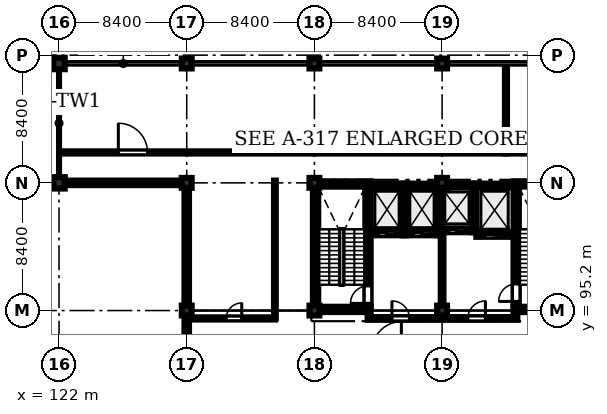
"""IFC4 building model, lengths in metres.
Left out: names, types, materials, properties, quantities, classifications, styles, units other than length and angle.
Written with IfcOpenShell. Run it as: python <this file> out.ifc"""

import sys

from ifc_helpers import new_model, si_unit, direction, frame, frame_2d, origin, origin_2d, place, context, subcontext, project, spatial, rectangle, extrude, element, fill, save


model = new_model("IFC4")
c1 = context("Model", 3, precision=1e-05, world=origin(), true_north=direction((0.0, 1.0)))
c2 = subcontext(c1, "Body", "Model", "MODEL_VIEW")
j1 = project(units=[si_unit("LENGTHUNIT", "METRE"), si_unit("PLANEANGLEUNIT", "RADIAN")], contexts=[c1])
p1 = place(None, origin())
s1 = spatial("IfcSite", under=j1, at=p1, CompositionType="ELEMENT")
p2 = place(p1, origin())
s2 = spatial("IfcBuilding", under=s1, at=p2, CompositionType="ELEMENT")
p3 = place(p2, frame((0.0, 0.0, 61.2)))
s3 = spatial("IfcBuildingStorey", under=s2, at=p3, CompositionType="ELEMENT", Elevation=61.2)
for number, where, z_axis, x_axis in (
    (1, (122.0, 103.6, 0.0), (0.0, 0.0, 1.0), (1.0, 0.0, 0.0)),
    (2, (122.0, 111.45, 0.0), (0.0, 0.0, 1.0), (1.0, 0.0, 0.0)),
):
    element("IfcColumn", number, at=place(p3, frame(where, z_axis=z_axis, x_axis=x_axis)), inside=s3, PredefinedType="COLUMN", context=c2, shape_type="SweptSolid", body=[
        extrude(rectangle(XDim=0.75, YDim=0.75, at=origin_2d()), origin(), (0.0, 0.0, 1.0), 4.28),
    ])
for number, where, z_axis, x_axis in (
    (3, (130.4, 95.2, 0.0), (0.0, 0.0, 1.0), (1.0, 0.0, 0.0)),
    (4, (130.4, 103.6, 0.0), (0.0, 0.0, 1.0), (1.0, 0.0, 0.0)),
    (5, (130.4, 111.45, 0.0), (0.0, 0.0, 1.0), (1.0, 0.0, 0.0)),
    (6, (138.8, 95.2, 0.0), (0.0, 0.0, 1.0), (1.0, 0.0, 0.0)),
    (7, (138.8, 103.6, 0.0), (0.0, 0.0, 1.0), (1.0, 0.0, 0.0)),
    (8, (138.8, 111.45, 0.0), (0.0, 0.0, 1.0), (1.0, 0.0, 0.0)),
    (9, (147.2, 95.2, 0.0), (0.0, 0.0, 1.0), (1.0, 0.0, 0.0)),
    (10, (147.2, 103.6, 0.0), (0.0, 0.0, 1.0), (1.0, 0.0, 0.0)),
    (11, (147.2, 111.45, 0.0), (0.0, 0.0, 1.0), (1.0, 0.0, 0.0)),
):
    element("IfcColumn", number, at=place(p3, frame(where, z_axis=z_axis, x_axis=x_axis)), inside=s3, PredefinedType="COLUMN", context=c2, shape_type="SweptSolid", body=[
        extrude(rectangle(XDim=0.65, YDim=0.65, at=origin_2d()), origin(), (0.0, 0.0, 1.0), 4.28),
    ])
for number, where, z_axis, x_axis in (
    (12, (138.7, 95.275, 0.0), (0.0, 0.0, 1.0), (1.0, 0.0, 0.0)),
    (13, (138.7, 103.525, 0.0), (0.0, 0.0, 1.0), (1.0, 0.0, 0.0)),
):
    element("IfcWall", number, at=place(p3, frame(where, z_axis=z_axis, x_axis=x_axis)), inside=s3, PredefinedType="SHEAR", context=c2, shape_type="SweptSolid", body=[
        extrude(rectangle(XDim=3.8, YDim=0.35, at=frame_2d((1.9, 0.0))), origin(), (0.0, 0.0, 1.0), 4.28),
    ])
p4 = place(p3, frame((138.875, 95.45, 0.0), z_axis=(0.0, 0.0, 1.0), x_axis=(0.0, 1.0, 0.0)))
e14 = element("IfcWall", 14, at=p4, inside=s3, PredefinedType="SHEAR", context=c2, shape_type="SweptSolid", body=[
    extrude(rectangle(XDim=7.9, YDim=0.35, at=frame_2d((3.95, 0.0))), origin(), (0.0, 0.0, 1.0), 4.28),
])
p5 = place(p3, frame((142.325, 95.45, 0.0), z_axis=(0.0, 0.0, 1.0), x_axis=(0.0, 1.0, 0.0)))
e15 = element("IfcWall", 15, at=p5, inside=s3, PredefinedType="SHEAR", context=c2, shape_type="SweptSolid", body=[
    extrude(rectangle(XDim=7.9, YDim=0.35, at=frame_2d((3.95, 0.0))), origin(), (0.0, 0.0, 1.0), 4.28),
])
p6 = place(p5, frame((0.22, 0.0, 0.0)))
e16 = element("IfcOpeningElement", 16, at=p6, cuts=e15, PredefinedType="OPENING", context=c2, shape_type="SweptSolid", body=[
    extrude(rectangle(XDim=1.15, YDim=2.15, at=frame_2d((0.575, 1.075))), frame((0.0, 0.185, 0.0), z_axis=(0.0, -1.0, 0.0), x_axis=(1.0, 0.0, 0.0)), (0.0, 0.0, 1.0), 0.37),
])
for number, where, z_axis, x_axis in (
    (17, (151.9, 95.275, 0.0), (0.0, 0.0, 1.0), (1.0, 0.0, 0.0)),
    (18, (151.9, 103.525, 0.0), (0.0, 0.0, 1.0), (1.0, 0.0, 0.0)),
):
    element("IfcWall", number, at=place(p3, frame(where, z_axis=z_axis, x_axis=x_axis)), inside=s3, PredefinedType="SHEAR", context=c2, shape_type="SweptSolid", body=[
        extrude(rectangle(XDim=3.8, YDim=0.35, at=frame_2d((1.9, 0.0))), origin(), (0.0, 0.0, 1.0), 4.28),
    ])
p7 = place(p3, frame((152.075, 95.45, 0.0), z_axis=(0.0, 0.0, 1.0), x_axis=(0.0, 1.0, 0.0)))
e19 = element("IfcWall", 19, at=p7, inside=s3, PredefinedType="SHEAR", context=c2, shape_type="SweptSolid", body=[
    extrude(rectangle(XDim=7.9, YDim=0.35, at=frame_2d((3.95, 0.0))), origin(), (0.0, 0.0, 1.0), 4.28),
])
p8 = place(p7, frame((0.35, 0.0, 0.0)))
e20 = element("IfcOpeningElement", 20, at=p8, cuts=e19, PredefinedType="OPENING", context=c2, shape_type="SweptSolid", body=[
    extrude(rectangle(XDim=1.15, YDim=2.15, at=frame_2d((0.575, 1.075))), frame((0.0, 0.185, 0.0), z_axis=(0.0, -1.0, 0.0), x_axis=(1.0, 0.0, 0.0)), (0.0, 0.0, 1.0), 0.37),
])
p9 = place(p3, frame((142.5, 100.275, 0.0), z_axis=(0.0, 0.0, 1.0), x_axis=(1.0, 0.0, 0.0)))
e21 = element("IfcWall", 21, at=p9, inside=s3, PredefinedType="SHEAR", context=c2, shape_type="SweptSolid", body=[
    extrude(rectangle(XDim=2.1, YDim=0.25, at=frame_2d((1.05, 0.0))), origin(), (0.0, 0.0, 1.0), 4.28),
])
p10 = place(p9, frame((0.5, 0.0, 0.0)))
e22 = element("IfcOpeningElement", 22, at=p10, cuts=e21, PredefinedType="OPENING", context=c2, shape_type="SweptSolid", body=[
    extrude(rectangle(XDim=1.1, YDim=2.15, at=frame_2d((0.55, 1.075))), frame((0.0, 0.135, 0.0), z_axis=(0.0, -1.0, 0.0), x_axis=(1.0, 0.0, 0.0)), (0.0, 0.0, 1.0), 0.27),
])
p11 = place(p3, frame((142.5, 103.425, 0.0), z_axis=(0.0, 0.0, 1.0), x_axis=(1.0, 0.0, 0.0)))
e23 = element("IfcWall", 23, at=p11, inside=s3, PredefinedType="SHEAR", context=c2, shape_type="SweptSolid", body=[
    extrude(rectangle(XDim=2.1, YDim=0.25, at=frame_2d((1.05, 0.0))), origin(), (0.0, 0.0, 1.0), 4.28),
])
p12 = place(p3, frame((144.725, 100.15, 0.0), z_axis=(0.0, 0.0, 1.0), x_axis=(0.0, 1.0, 0.0)))
e24 = element("IfcWall", 24, at=p12, inside=s3, PredefinedType="SHEAR", context=c2, shape_type="SweptSolid", body=[
    extrude(rectangle(XDim=3.4, YDim=0.25, at=frame_2d((1.7, 0.0))), origin(), (0.0, 0.0, 1.0), 4.28),
])
p13 = place(p3, frame((144.85, 100.275, 0.0), z_axis=(0.0, 0.0, 1.0), x_axis=(1.0, 0.0, 0.0)))
e25 = element("IfcWall", 25, at=p13, inside=s3, PredefinedType="SHEAR", context=c2, shape_type="SweptSolid", body=[
    extrude(rectangle(XDim=2.05, YDim=0.25, at=frame_2d((1.025, 0.0))), origin(), (0.0, 0.0, 1.0), 4.28),
])
p14 = place(p13, frame((0.465, 0.0, 0.0)))
e26 = element("IfcOpeningElement", 26, at=p14, cuts=e25, PredefinedType="OPENING", context=c2, shape_type="SweptSolid", body=[
    extrude(rectangle(XDim=1.12, YDim=2.15, at=frame_2d((0.56, 1.075))), frame((0.0, 0.135, 0.0), z_axis=(0.0, -1.0, 0.0), x_axis=(1.0, 0.0, 0.0)), (0.0, 0.0, 1.0), 0.27),
])
p15 = place(p3, frame((144.85, 103.425, 0.0), z_axis=(0.0, 0.0, 1.0), x_axis=(1.0, 0.0, 0.0)))
e27 = element("IfcWall", 27, at=p15, inside=s3, PredefinedType="SHEAR", context=c2, shape_type="SweptSolid", body=[
    extrude(rectangle(XDim=2.05, YDim=0.25, at=frame_2d((1.025, 0.0))), origin(), (0.0, 0.0, 1.0), 4.28),
])
p16 = place(p3, frame((147.025, 100.15, 0.0), z_axis=(0.0, 0.0, 1.0), x_axis=(0.0, 1.0, 0.0)))
e28 = element("IfcWall", 28, at=p16, inside=s3, PredefinedType="SHEAR", context=c2, shape_type="SweptSolid", body=[
    extrude(rectangle(XDim=3.4, YDim=0.25, at=frame_2d((1.7, 0.0))), origin(), (0.0, 0.0, 1.0), 4.28),
])
p17 = place(p3, frame((147.15, 100.475, 0.0), z_axis=(0.0, 0.0, 1.0), x_axis=(1.0, 0.0, 0.0)))
e29 = element("IfcWall", 29, at=p17, inside=s3, PredefinedType="SHEAR", context=c2, shape_type="SweptSolid", body=[
    extrude(rectangle(XDim=2.05, YDim=0.25, at=frame_2d((1.025, 0.0))), origin(), (0.0, 0.0, 1.0), 4.28),
])
p18 = place(p17, frame((0.495, 0.0, 0.0)))
e30 = element("IfcOpeningElement", 30, at=p18, cuts=e29, PredefinedType="OPENING", context=c2, shape_type="SweptSolid", body=[
    extrude(rectangle(XDim=1.06, YDim=2.15, at=frame_2d((0.53, 1.075))), frame((0.0, 0.135, 0.0), z_axis=(0.0, -1.0, 0.0), x_axis=(1.0, 0.0, 0.0)), (0.0, 0.0, 1.0), 0.27),
])
p19 = place(p3, frame((147.15, 103.425, 0.0), z_axis=(0.0, 0.0, 1.0), x_axis=(1.0, 0.0, 0.0)))
e31 = element("IfcWall", 31, at=p19, inside=s3, PredefinedType="SHEAR", context=c2, shape_type="SweptSolid", body=[
    extrude(rectangle(XDim=2.05, YDim=0.25, at=frame_2d((1.025, 0.0))), origin(), (0.0, 0.0, 1.0), 4.28),
])
p20 = place(p3, frame((149.325, 100.35, 0.0), z_axis=(0.0, 0.0, 1.0), x_axis=(0.0, 1.0, 0.0)))
e32 = element("IfcWall", 32, at=p20, inside=s3, PredefinedType="SHEAR", context=c2, shape_type="SweptSolid", body=[
    extrude(rectangle(XDim=3.2, YDim=0.25, at=frame_2d((1.6, 0.0))), origin(), (0.0, 0.0, 1.0), 4.28),
])
p21 = place(p3, frame((149.45, 100.175, 0.0), z_axis=(0.0, 0.0, 1.0), x_axis=(1.0, 0.0, 0.0)))
e33 = element("IfcWall", 33, at=p21, inside=s3, PredefinedType="SHEAR", context=c2, shape_type="SweptSolid", body=[
    extrude(rectangle(XDim=2.45, YDim=0.25, at=frame_2d((1.225, 0.0))), origin(), (0.0, 0.0, 1.0), 4.28),
])
p22 = place(p21, frame((0.575, 0.0, 0.0)))
e34 = element("IfcOpeningElement", 34, at=p22, cuts=e33, PredefinedType="OPENING", context=c2, shape_type="SweptSolid", body=[
    extrude(rectangle(XDim=1.3, YDim=2.25, at=frame_2d((0.65, 1.125))), frame((0.0, 0.135, 0.0), z_axis=(0.0, -1.0, 0.0), x_axis=(1.0, 0.0, 0.0)), (0.0, 0.0, 1.0), 0.27),
])
p23 = place(p3, frame((149.45, 103.425, 0.0), z_axis=(0.0, 0.0, 1.0), x_axis=(1.0, 0.0, 0.0)))
e35 = element("IfcWall", 35, at=p23, inside=s3, PredefinedType="SHEAR", context=c2, shape_type="SweptSolid", body=[
    extrude(rectangle(XDim=2.45, YDim=0.25, at=frame_2d((1.225, 0.0))), origin(), (0.0, 0.0, 1.0), 4.28),
])
p24 = place(p3, frame((130.4, 92.15, 0.0), z_axis=(0.0, 0.0, 1.0), x_axis=(0.0, 1.0, 0.0)))
e36 = element("IfcWall", 36, at=p24, inside=s3, PredefinedType="STANDARD", context=c2, shape_type="SweptSolid", body=[
    extrude(rectangle(XDim=2.725, YDim=0.3, at=frame_2d((1.363, 0.0))), origin(), (0.0, 0.0, 1.0), 4.28),
])
p25 = place(p3, frame((130.4, 95.525, 0.0), z_axis=(0.0, 0.0, 1.0), x_axis=(0.0, 1.0, 0.0)))
e37 = element("IfcWall", 37, at=p25, inside=s3, PredefinedType="STANDARD", context=c2, shape_type="SweptSolid", body=[
    extrude(rectangle(XDim=7.75, YDim=0.3, at=frame_2d((3.875, 0.0))), origin(), (0.0, 0.0, 1.0), 3.58),
])
p26 = place(p25, frame((2.4, 0.0, 1.0)))
e38 = element("IfcOpeningElement", 38, at=p26, cuts=e37, PredefinedType="OPENING", context=c2, shape_type="SweptSolid", body=[
    extrude(rectangle(XDim=1.8, YDim=1.8, at=frame_2d((0.9, 0.9))), frame((0.0, 0.16, 0.0), z_axis=(0.0, -1.0, 0.0), x_axis=(1.0, 0.0, 0.0)), (0.0, 0.0, 1.0), 0.32),
])
p27 = place(p3, frame((130.075, 103.6, 0.0), z_axis=(0.0, 0.0, 1.0), x_axis=(-1.0, 0.0, 0.0)))
e39 = element("IfcWall", 39, at=p27, inside=s3, PredefinedType="STANDARD", context=c2, shape_type="SweptSolid", body=[
    extrude(rectangle(XDim=7.7, YDim=0.3, at=frame_2d((3.85, 0.0))), origin(), (0.0, 0.0, 1.0), 3.58),
])
p28 = place(p3, frame((142.3, 94.68, 0.0), z_axis=(0.0, 0.0, 1.0), x_axis=(1.0, 0.0, 0.0)))
e40 = element("IfcWall", 40, at=p28, inside=s3, PredefinedType="STANDARD", context=c2, shape_type="SweptSolid", body=[
    extrude(rectangle(XDim=4.8, YDim=0.18, at=frame_2d((2.4, 0.0))), origin(), (0.0, 0.0, 1.0), 4.28),
])
p29 = place(p28, frame((1.6, 0.0, 0.0)))
e41 = element("IfcOpeningElement", 41, at=p29, cuts=e40, PredefinedType="OPENING", context=c2, shape_type="SweptSolid", body=[
    extrude(rectangle(XDim=1.15, YDim=2.15, at=frame_2d((0.575, 1.075))), frame((0.0, 0.1, 0.0), z_axis=(0.0, -1.0, 0.0), x_axis=(1.0, 0.0, 0.0)), (0.0, 0.0, 1.0), 0.2),
])
p30 = place(p3, frame((147.3, 94.68, 0.0), z_axis=(0.0, 0.0, 1.0), x_axis=(1.0, 0.0, 0.0)))
e42 = element("IfcWall", 42, at=p30, inside=s3, PredefinedType="STANDARD", context=c2, shape_type="SweptSolid", body=[
    extrude(rectangle(XDim=4.85, YDim=0.18, at=frame_2d((2.425, 0.0))), origin(), (0.0, 0.0, 1.0), 4.28),
])
p31 = place(p30, frame((1.6, 0.0, 0.0)))
e43 = element("IfcOpeningElement", 43, at=p31, cuts=e42, PredefinedType="OPENING", context=c2, shape_type="SweptSolid", body=[
    extrude(rectangle(XDim=1.15, YDim=2.15, at=frame_2d((0.575, 1.075))), frame((0.0, 0.1, 0.0), z_axis=(0.0, -1.0, 0.0), x_axis=(1.0, 0.0, 0.0)), (0.0, 0.0, 1.0), 0.2),
])
p32 = place(p3, frame((147.2, 95.75, 0.0), z_axis=(0.0, 0.0, 1.0), x_axis=(0.0, 1.0, 0.0)))
e44 = element("IfcWall", 44, at=p32, inside=s3, PredefinedType="STANDARD", context=c2, shape_type="SweptSolid", body=[
    extrude(rectangle(XDim=4.5, YDim=0.18, at=frame_2d((2.25, 0.0))), origin(), (0.0, 0.0, 1.0), 3.58),
])
p33 = place(p3, frame((136.2, 94.68, 0.0), z_axis=(0.0, 0.0, 1.0), x_axis=(0.0, 1.0, 0.0)))
e45 = element("IfcWall", 45, at=p33, inside=s3, PredefinedType="PARTITIONING", context=c2, shape_type="SweptSolid", body=[
    extrude(rectangle(XDim=9.07, YDim=0.12, at=frame_2d((4.535, 0.0))), origin(), (0.0, 0.0, 1.0), 4.28),
])
p34 = place(p3, frame((130.8, 94.68, 0.0), z_axis=(0.0, 0.0, 1.0), x_axis=(1.0, 0.0, 0.0)))
e46 = element("IfcWall", 46, at=p34, inside=s3, PredefinedType="PARTITIONING", context=c2, shape_type="SweptSolid", body=[
    extrude(rectangle(XDim=5.4, YDim=0.145, at=frame_2d((2.7, 0.0))), origin(), (0.0, 0.0, 1.0), 4.28),
])
p35 = place(p34, frame((2.2, 0.0, 0.0)))
e47 = element("IfcOpeningElement", 47, at=p35, cuts=e46, PredefinedType="OPENING", context=c2, shape_type="SweptSolid", body=[
    extrude(rectangle(XDim=1.02, YDim=2.15, at=frame_2d((0.51, 1.075))), frame((0.0, 0.083, 0.0), z_axis=(0.0, -1.0, 0.0), x_axis=(1.0, 0.0, 0.0)), (0.0, 0.0, 1.0), 0.165),
])
p36 = place(p3, frame((122.15, 105.6, 0.0), z_axis=(0.0, 0.0, 1.0), x_axis=(1.0, 0.0, 0.0)))
e48 = element("IfcWall", 48, at=p36, inside=s3, PredefinedType="PARTITIONING", context=c2, shape_type="SweptSolid", body=[
    extrude(rectangle(XDim=29.25, YDim=0.145, at=frame_2d((14.625, 0.0))), origin(), (0.0, 0.0, 1.0), 4.28),
])
p37 = place(p36, frame((3.75, 0.0, 0.0)))
e49 = element("IfcOpeningElement", 49, at=p37, cuts=e48, PredefinedType="OPENING", context=c2, shape_type="SweptSolid", body=[
    extrude(rectangle(XDim=1.92, YDim=2.28, at=frame_2d((0.96, 1.14))), frame((0.0, 0.083, 0.0), z_axis=(0.0, -1.0, 0.0), x_axis=(1.0, 0.0, 0.0)), (0.0, 0.0, 1.0), 0.165),
])
p38 = place(p3, frame((151.4, 105.6, 0.0), z_axis=(0.0, 0.0, 1.0), x_axis=(1.0, 0.0, 0.0)))
e50 = element("IfcWall", 50, at=p38, inside=s3, PredefinedType="PARTITIONING", context=c2, shape_type="SweptSolid", body=[
    extrude(rectangle(XDim=11.95, YDim=0.145, at=frame_2d((5.975, 0.0))), origin(), (0.0, 0.0, 1.0), 4.28),
])
p39 = place(p38, frame((6.8, 0.0, 0.0)))
e51 = element("IfcOpeningElement", 51, at=p39, cuts=e50, PredefinedType="OPENING", context=c2, shape_type="SweptSolid", body=[
    extrude(rectangle(XDim=1.08, YDim=2.15, at=frame_2d((0.54, 1.075))), frame((0.0, 0.083, 0.0), z_axis=(0.0, -1.0, 0.0), x_axis=(1.0, 0.0, 0.0)), (0.0, 0.0, 1.0), 0.165),
])
p40 = place(p3, frame((151.4, 105.6, 0.0), z_axis=(0.0, 0.0, 1.0), x_axis=(0.0, 1.0, 0.0)))
e52 = element("IfcWall", 52, at=p40, inside=s3, PredefinedType="PARTITIONING", context=c2, shape_type="SweptSolid", body=[
    extrude(rectangle(XDim=5.75, YDim=0.135, at=frame_2d((2.875, 0.0))), origin(), (0.0, 0.0, 1.0), 3.83),
])
p41 = place(p26, origin())
e53 = element("IfcWindow", 53, at=p41, inside=s3, PartitioningType="DOUBLE_PANEL_VERTICAL", PredefinedType="WINDOW", context=c2, shape_type="SweptSolid", body=[
    extrude(rectangle(XDim=1.8, YDim=1.8, at=frame_2d((0.9, 0.9))), frame((0.0, 0.03, 0.0), z_axis=(0.0, -1.0, 0.0), x_axis=(1.0, 0.0, 0.0)), (0.0, 0.0, 1.0), 0.06),
])
fill(e38, e53)
p42 = place(p29, origin())
e54 = element("IfcDoor", 54, at=p42, inside=s3, OperationType="SINGLE_SWING_LEFT", PredefinedType="DOOR", context=c2, shape_type="SweptSolid", body=[
    extrude(rectangle(XDim=1.15, YDim=2.15, at=frame_2d((0.575, 1.075))), frame((0.0, 0.025, 0.0), z_axis=(0.0, -1.0, 0.0), x_axis=(1.0, 0.0, 0.0)), (0.0, 0.0, 1.0), 0.05),
])
fill(e41, e54)
p43 = place(p31, origin())
e55 = element("IfcDoor", 55, at=p43, inside=s3, OperationType="SINGLE_SWING_RIGHT", PredefinedType="DOOR", context=c2, shape_type="SweptSolid", body=[
    extrude(rectangle(XDim=1.15, YDim=2.15, at=frame_2d((0.575, 1.075))), frame((0.0, 0.025, 0.0), z_axis=(0.0, -1.0, 0.0), x_axis=(1.0, 0.0, 0.0)), (0.0, 0.0, 1.0), 0.05),
])
fill(e43, e55)
p44 = place(p35, origin())
e56 = element("IfcDoor", 56, at=p44, inside=s3, OperationType="SINGLE_SWING_RIGHT", PredefinedType="DOOR", context=c2, shape_type="SweptSolid", body=[
    extrude(rectangle(XDim=1.02, YDim=2.15, at=frame_2d((0.51, 1.075))), frame((0.0, 0.025, 0.0), z_axis=(0.0, -1.0, 0.0), x_axis=(1.0, 0.0, 0.0)), (0.0, 0.0, 1.0), 0.05),
])
fill(e47, e56)
p45 = place(p37, origin())
e57 = element("IfcDoor", 57, at=p45, inside=s3, OperationType="SINGLE_SWING_LEFT", PredefinedType="DOOR", context=c2, shape_type="SweptSolid", body=[
    extrude(rectangle(XDim=1.92, YDim=2.28, at=frame_2d((0.96, 1.14))), frame((0.0, 0.025, 0.0), z_axis=(0.0, -1.0, 0.0), x_axis=(1.0, 0.0, 0.0)), (0.0, 0.0, 1.0), 0.05),
])
fill(e49, e57)
p46 = place(p6, origin())
e58 = element("IfcDoor", 58, at=p46, inside=s3, OperationType="SINGLE_SWING_LEFT", PredefinedType="DOOR", context=c2, shape_type="SweptSolid", body=[
    extrude(rectangle(XDim=1.15, YDim=2.15, at=frame_2d((0.575, 1.075))), frame((0.0, 0.025, 0.0), z_axis=(0.0, -1.0, 0.0), x_axis=(1.0, 0.0, 0.0)), (0.0, 0.0, 1.0), 0.05),
])
fill(e16, e58)
p47 = place(p8, origin())
e59 = element("IfcDoor", 59, at=p47, inside=s3, OperationType="SINGLE_SWING_LEFT", PredefinedType="DOOR", context=c2, shape_type="SweptSolid", body=[
    extrude(rectangle(XDim=1.15, YDim=2.15, at=frame_2d((0.575, 1.075))), frame((0.0, 0.025, 0.0), z_axis=(0.0, -1.0, 0.0), x_axis=(1.0, 0.0, 0.0)), (0.0, 0.0, 1.0), 0.05),
])
fill(e20, e59)
p48 = place(p10, origin())
e60 = element("IfcDoor", 60, at=p48, inside=s3, OperationType="SLIDING_TO_LEFT", PredefinedType="DOOR", context=c2, shape_type="SweptSolid", body=[
    extrude(rectangle(XDim=1.1, YDim=2.15, at=frame_2d((0.55, 1.075))), frame((0.0, 0.025, 0.0), z_axis=(0.0, -1.0, 0.0), x_axis=(1.0, 0.0, 0.0)), (0.0, 0.0, 1.0), 0.05),
])
fill(e22, e60)
p49 = place(p14, origin())
e61 = element("IfcDoor", 61, at=p49, inside=s3, OperationType="SLIDING_TO_LEFT", PredefinedType="DOOR", context=c2, shape_type="SweptSolid", body=[
    extrude(rectangle(XDim=1.12, YDim=2.15, at=frame_2d((0.56, 1.075))), frame((0.0, 0.025, 0.0), z_axis=(0.0, -1.0, 0.0), x_axis=(1.0, 0.0, 0.0)), (0.0, 0.0, 1.0), 0.05),
])
fill(e26, e61)
p50 = place(p18, origin())
e62 = element("IfcDoor", 62, at=p50, inside=s3, OperationType="SLIDING_TO_LEFT", PredefinedType="DOOR", context=c2, shape_type="SweptSolid", body=[
    extrude(rectangle(XDim=1.06, YDim=2.15, at=frame_2d((0.53, 1.075))), frame((0.0, 0.025, 0.0), z_axis=(0.0, -1.0, 0.0), x_axis=(1.0, 0.0, 0.0)), (0.0, 0.0, 1.0), 0.05),
])
fill(e30, e62)
p51 = place(p22, origin())
e63 = element("IfcDoor", 63, at=p51, inside=s3, OperationType="SLIDING_TO_LEFT", PredefinedType="DOOR", context=c2, shape_type="SweptSolid", body=[
    extrude(rectangle(XDim=1.3, YDim=2.25, at=frame_2d((0.65, 1.125))), frame((0.0, 0.025, 0.0), z_axis=(0.0, -1.0, 0.0), x_axis=(1.0, 0.0, 0.0)), (0.0, 0.0, 1.0), 0.05),
])
fill(e34, e63)
save(model, sys.argv[1])
